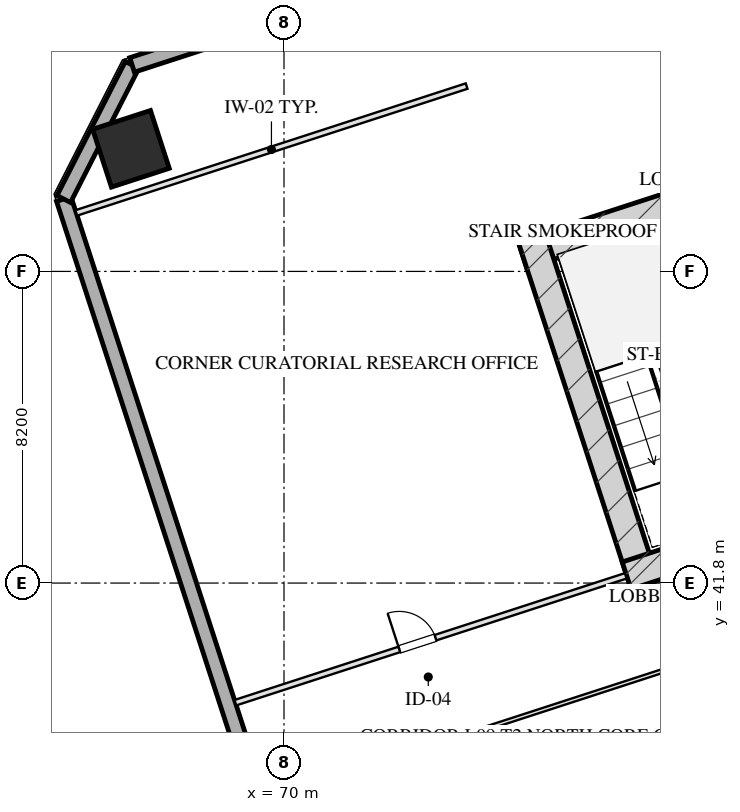
"""IFC4 building model, lengths in metres.
Left out: names, types, materials, properties, quantities, classifications, styles, units other than length and angle.
Written with IfcOpenShell. Run it as: python <this file> out.ifc"""

import sys

from ifc_helpers import new_model, si_unit, direction, frame, frame_2d, origin, origin_2d, place, context, subcontext, project, spatial, rectangle, hollow_rectangle, extrude, element, fill, save


model = new_model("IFC4")
c1 = context("Model", 3, precision=1e-05, world=origin(), true_north=direction((0.0, 1.0)))
c2 = subcontext(c1, "Body", "Model", "MODEL_VIEW")
j1 = project(units=[si_unit("LENGTHUNIT", "METRE"), si_unit("PLANEANGLEUNIT", "RADIAN")], contexts=[c1])
p1 = place(None, origin())
s1 = spatial("IfcSite", under=j1, at=p1, CompositionType="ELEMENT")
p2 = place(p1, origin())
s2 = spatial("IfcBuilding", under=s1, at=p2, CompositionType="ELEMENT")
p3 = place(p2, frame((0.0, 0.0, 42.0)))
s3 = spatial("IfcBuildingStorey", under=s2, at=p3, CompositionType="ELEMENT", Elevation=42.0)
p4 = place(p3, frame((76.272, 50.443, 0.0), z_axis=(0.0, 0.0, 1.0), x_axis=(0.951056072937, 0.309018358888, 0.0)))
e1 = element("IfcWall", 1, at=p4, inside=s3, PredefinedType="SHEAR", context=c2, shape_type="SweptSolid", body=[
    extrude(rectangle(XDim=16.55, YDim=0.75, at=frame_2d((8.275, 0.0))), origin(), (0.0, 0.0, 1.0), 4.0),
])
p5 = place(p3, frame((79.489, 41.756, 0.0), z_axis=(0.0, 0.0, 1.0), x_axis=(-0.309016134813, 0.951056795583, 0.0)))
e2 = element("IfcWall", 2, at=p5, inside=s3, PredefinedType="SHEAR", context=c2, shape_type="SweptSolid", body=[
    extrude(rectangle(XDim=9.63, YDim=0.75, at=frame_2d((4.815, 0.0))), origin(), (0.0, 0.0, 1.0), 4.0),
])
p6 = place(p3, frame((79.016, 41.997, 0.0), z_axis=(0.0, 0.0, 1.0), x_axis=(0.95106038264, 0.309005094736, 0.0)))
e3 = element("IfcWall", 3, at=p6, inside=s3, PredefinedType="SHEAR", context=c2, shape_type="SweptSolid", body=[
    extrude(rectangle(XDim=4.295, YDim=0.75, at=frame_2d((2.147, 0.0))), origin(), (0.0, 0.0, 1.0), 4.0),
])
p7 = place(p3, frame((65.973, 53.226, 0.0), z_axis=(0.0, 0.0, 1.0), x_axis=(0.951056516295, 0.309016994375, 0.0)))
e4 = element("IfcColumn", 4, at=p7, inside=s3, PredefinedType="COLUMN", context=c2, shape_type="SweptSolid", body=[
    extrude(hollow_rectangle(XDim=1.6, YDim=1.6, WallThickness=0.055, at=origin_2d()), origin(), (0.0, 0.0, 1.0), 4.001),
])
p8 = place(p3, frame((79.655, 4.352, 0.0), z_axis=(0.0, 0.0, 1.0), x_axis=(-0.309014526607, 0.951057318118, 0.0)))
e5 = element("IfcWall", 5, at=p8, inside=s3, PredefinedType="SOLIDWALL", context=c2, shape_type="SweptSolid", body=[
    extrude(rectangle(XDim=50.0, YDim=0.4, at=frame_2d((25.0, 0.0))), origin(), (0.0, 0.0, 1.0), 3.1),
])
p9 = place(p3, frame((64.205, 51.905, 0.0), z_axis=(0.0, 0.0, 1.0), x_axis=(0.453958106755, 0.891023028497, 0.0)))
e6 = element("IfcWall", 6, at=p9, inside=s3, PredefinedType="SOLIDWALL", context=c2, shape_type="SweptSolid", body=[
    extrude(rectangle(XDim=3.96, YDim=0.4, at=frame_2d((1.98, 0.0))), origin(), (0.0, 0.0, 1.0), 3.1),
])
p10 = place(p3, frame((66.002, 55.433, 0.0), z_axis=(0.0, 0.0, 1.0), x_axis=(0.951055939317, 0.309018770125, 0.0)))
e7 = element("IfcWall", 7, at=p10, inside=s3, PredefinedType="SOLIDWALL", context=c2, shape_type="SweptSolid", body=[
    extrude(rectangle(XDim=32.4, YDim=0.4, at=frame_2d((16.2, 0.0))), origin(), (0.0, 0.0, 1.0), 3.1),
])
p11 = place(p3, frame((64.534, 51.539, 0.0), z_axis=(0.0, 0.0, 1.0), x_axis=(0.951056658866, 0.309016555588, 0.0)))
e8 = element("IfcWall", 8, at=p11, inside=s3, PredefinedType="PARTITIONING", context=c2, shape_type="SweptSolid", body=[
    extrude(rectangle(XDim=10.8, YDim=0.15, at=frame_2d((5.4, 0.0))), origin(), (0.0, 0.0, 1.0), 3.705),
])
p12 = place(p3, frame((68.721, 38.652, 0.0), z_axis=(0.0, 0.0, 1.0), x_axis=(0.951056658866, 0.309016555588, 0.0)))
e9 = element("IfcWall", 9, at=p12, inside=s3, PredefinedType="PARTITIONING", context=c2, shape_type="SweptSolid", body=[
    extrude(rectangle(XDim=10.8, YDim=0.15, at=frame_2d((5.4, 0.0))), origin(), (0.0, 0.0, 1.0), 3.705),
])
p13 = place(p12, frame((4.536, 0.0, 0.0)))
e10 = element("IfcOpeningElement", 10, at=p13, cuts=e9, PredefinedType="OPENING", context=c2, shape_type="SweptSolid", body=[
    extrude(rectangle(XDim=1.0, YDim=2.05, at=frame_2d((0.5, 1.025))), frame((0.0, 0.085, 0.0), z_axis=(0.0, -1.0, 0.0), x_axis=(1.0, 0.0, 0.0)), (0.0, 0.0, 1.0), 0.17),
])
for number, where, z_axis, x_axis in (
    (11, (69.549, 36.103, 0.0), (0.0, 0.0, 1.0), (0.951, 0.309, 0.0)),
    (12, (70.575, 32.946, 0.0), (0.0, 0.0, 1.0), (0.951, 0.309, 0.0)),
):
    element("IfcWall", number, at=place(p3, frame(where, z_axis=z_axis, x_axis=x_axis)), inside=s3, PredefinedType="MOVABLE", context=c2, shape_type="SweptSolid", body=[
        extrude(rectangle(XDim=18.075, YDim=0.1, at=frame_2d((9.038, 0.0))), origin(), (0.0, 0.0, 1.0), 3.705),
    ])
p14 = place(p13, origin())
e13 = element("IfcDoor", 13, at=p14, inside=s3, OperationType="SINGLE_SWING_LEFT", PredefinedType="DOOR", context=c2, shape_type="SweptSolid", body=[
    extrude(rectangle(XDim=1.0, YDim=2.05, at=frame_2d((0.5, 1.025))), frame((0.0, 0.025, 0.0), z_axis=(0.0, -1.0, 0.0), x_axis=(1.0, 0.0, 0.0)), (0.0, 0.0, 1.0), 0.05),
])
fill(e10, e13)
save(model, sys.argv[1])
